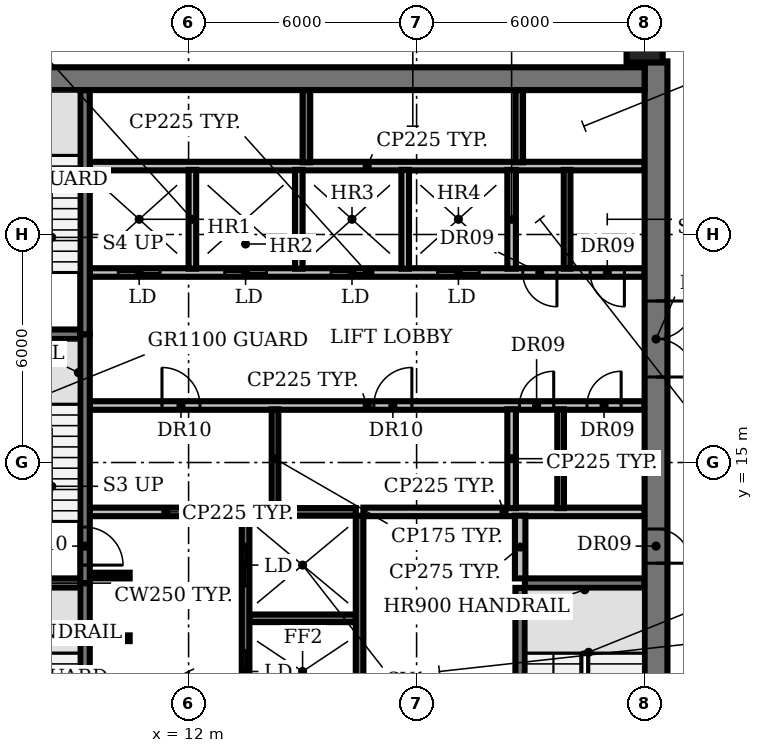
"""IFC4 building model, lengths in metres.
Left out: names, types, materials, properties, quantities, classifications, styles, units other than length and angle.
Written with IfcOpenShell. Run it as: python <this file> out.ifc"""

import sys

from ifc_helpers import new_model, si_unit, direction, frame, frame_2d, origin, origin_2d, place, context, subcontext, project, spatial, rectangle, circle, extrude, element, fill, save


model = new_model("IFC4")
c1 = context("Model", 3, precision=1e-05, world=origin(), true_north=direction((0.0, 1.0)))
c2 = subcontext(c1, "Body", "Model", "MODEL_VIEW")
j1 = project(units=[si_unit("LENGTHUNIT", "METRE"), si_unit("PLANEANGLEUNIT", "RADIAN")], contexts=[c1])
p1 = place(None, origin())
s1 = spatial("IfcSite", under=j1, at=p1, CompositionType="ELEMENT")
p2 = place(p1, origin())
s2 = spatial("IfcBuilding", under=s1, at=p2, CompositionType="ELEMENT")
p3 = place(p2, frame((0.0, 0.0, 180.2)))
s3 = spatial("IfcBuildingStorey", under=s2, at=p3, CompositionType="ELEMENT", Elevation=180.2)
p4 = place(p3, frame((24.0, 26.0, 0.0), z_axis=(0.0, 0.0, 1.0), x_axis=(1.0, 0.0, 0.0)))
e1 = element("IfcColumn", 1, at=p4, inside=s3, PredefinedType="COLUMN", context=c2, shape_type="SweptSolid", body=[
    extrude(circle(Radius=0.475, at=origin_2d()), origin(), (0.0, 0.0, 1.0), 3.85),
])
p5 = place(p3, frame((9.4, 10.375, 0.0), z_axis=(0.0, 0.0, 1.0), x_axis=(1.0, 0.0, 0.0)))
e2 = element("IfcWall", 2, at=p5, inside=s3, PredefinedType="SHEAR", context=c2, shape_type="SweptSolid", body=[
    extrude(rectangle(XDim=1.05, YDim=0.15, at=frame_2d((0.525, 0.0))), origin(), (0.0, 0.0, 1.0), 3.85),
])
p6 = place(p3, frame((13.6, 10.9, 0.0), z_axis=(0.0, 0.0, 1.0), x_axis=(1.0, 0.0, 0.0)))
e3 = element("IfcWall", 3, at=p6, inside=s3, PredefinedType="SHEAR", context=c2, shape_type="SweptSolid", body=[
    extrude(rectangle(XDim=2.8, YDim=0.2, at=frame_2d((1.4, 0.0))), origin(), (0.0, 0.0, 1.0), 3.85),
])
for number, where, z_axis, x_axis in (
    (4, (6.0, 11.825, 0.0), (0.0, 0.0, 1.0), (1.0, 0.0, 0.0)),
    (5, (20.85, 11.825, 0.0), (0.0, 0.0, 1.0), (1.0, 0.0, 0.0)),
):
    element("IfcWall", number, at=place(p3, frame(where, z_axis=z_axis, x_axis=x_axis)), inside=s3, PredefinedType="SHEAR", context=c2, shape_type="SweptSolid", body=[
        extrude(rectangle(XDim=3.15, YDim=0.25, at=frame_2d((1.575, 0.0))), origin(), (0.0, 0.0, 1.0), 3.85),
    ])
p7 = place(p3, frame((9.4, 12.025, 0.0), z_axis=(0.0, 0.0, 1.0), x_axis=(1.0, 0.0, 0.0)))
e6 = element("IfcWall", 6, at=p7, inside=s3, PredefinedType="SHEAR", context=c2, shape_type="SweptSolid", body=[
    extrude(rectangle(XDim=1.05, YDim=0.15, at=frame_2d((0.525, 0.0))), origin(), (0.0, 0.0, 1.0), 3.85),
])
p8 = place(p3, frame((9.4, 13.7, 0.0), z_axis=(0.0, 0.0, 1.0), x_axis=(1.0, 0.0, 0.0)))
e7 = element("IfcWall", 7, at=p8, inside=s3, PredefinedType="PARTITIONING", context=c2, shape_type="SweptSolid", body=[
    extrude(rectangle(XDim=4.0, YDim=0.225, at=frame_2d((2.0, 0.0))), origin(), (0.0, 0.0, 1.0), 3.85),
])
p9 = place(p3, frame((13.6, 13.7, 0.0), z_axis=(0.0, 0.0, 1.0), x_axis=(1.0, 0.0, 0.0)))
e8 = element("IfcWall", 8, at=p9, inside=s3, PredefinedType="SHEAR", context=c2, shape_type="SweptSolid", body=[
    extrude(rectangle(XDim=2.8, YDim=0.2, at=frame_2d((1.4, 0.0))), origin(), (0.0, 0.0, 1.0), 3.85),
])
p10 = place(p3, frame((16.6, 13.7, 0.0), z_axis=(0.0, 0.0, 1.0), x_axis=(1.0, 0.0, 0.0)))
e9 = element("IfcWall", 9, at=p10, inside=s3, PredefinedType="PARTITIONING", context=c2, shape_type="SweptSolid", body=[
    extrude(rectangle(XDim=7.4, YDim=0.225, at=frame_2d((3.7, 0.0))), origin(), (0.0, 0.0, 1.0), 3.85),
])
p11 = place(p3, frame((9.4, 16.5, 0.0), z_axis=(0.0, 0.0, 1.0), x_axis=(1.0, 0.0, 0.0)))
e10 = element("IfcWall", 10, at=p11, inside=s3, PredefinedType="PARTITIONING", context=c2, shape_type="SweptSolid", body=[
    extrude(rectangle(XDim=14.6, YDim=0.225, at=frame_2d((7.3, 0.0))), origin(), (0.0, 0.0, 1.0), 3.85),
])
p12 = place(p11, frame((1.9, 0.0, 0.0)))
e11 = element("IfcOpeningElement", 11, at=p12, cuts=e10, PredefinedType="OPENING", context=c2, shape_type="SweptSolid", body=[
    extrude(rectangle(XDim=1.0, YDim=2.1, at=frame_2d((0.5, 1.05))), frame((0.0, 0.123, 0.0), z_axis=(0.0, -1.0, 0.0), x_axis=(1.0, 0.0, 0.0)), (0.0, 0.0, 1.0), 0.245),
])
p13 = place(p11, frame((7.475, 0.0, 0.0)))
e12 = element("IfcOpeningElement", 12, at=p13, cuts=e10, PredefinedType="OPENING", context=c2, shape_type="SweptSolid", body=[
    extrude(rectangle(XDim=1.0, YDim=2.1, at=frame_2d((0.5, 1.05))), frame((0.0, 0.123, 0.0), z_axis=(0.0, -1.0, 0.0), x_axis=(1.0, 0.0, 0.0)), (0.0, 0.0, 1.0), 0.245),
])
p14 = place(p11, frame((11.308, 0.0, 0.0)))
e13 = element("IfcOpeningElement", 13, at=p14, cuts=e10, PredefinedType="OPENING", context=c2, shape_type="SweptSolid", body=[
    extrude(rectangle(XDim=0.9, YDim=2.1, at=frame_2d((0.45, 1.05))), frame((0.0, 0.123, 0.0), z_axis=(0.0, -1.0, 0.0), x_axis=(1.0, 0.0, 0.0)), (0.0, 0.0, 1.0), 0.245),
])
p15 = place(p11, frame((13.083, 0.0, 0.0)))
e14 = element("IfcOpeningElement", 14, at=p15, cuts=e10, PredefinedType="OPENING", context=c2, shape_type="SweptSolid", body=[
    extrude(rectangle(XDim=0.9, YDim=2.1, at=frame_2d((0.45, 1.05))), frame((0.0, 0.123, 0.0), z_axis=(0.0, -1.0, 0.0), x_axis=(1.0, 0.0, 0.0)), (0.0, 0.0, 1.0), 0.245),
])
p16 = place(p3, frame((6.0, 18.375, 0.0), z_axis=(0.0, 0.0, 1.0), x_axis=(1.0, 0.0, 0.0)))
e15 = element("IfcWall", 15, at=p16, inside=s3, PredefinedType="SHEAR", context=c2, shape_type="SweptSolid", body=[
    extrude(rectangle(XDim=3.15, YDim=0.25, at=frame_2d((1.575, 0.0))), origin(), (0.0, 0.0, 1.0), 3.85),
])
p17 = place(p3, frame((24.0, 20.0, 0.0), z_axis=(0.0, 0.0, 1.0), x_axis=(-1.0, 0.0, 0.0)))
e16 = element("IfcWall", 16, at=p17, inside=s3, PredefinedType="PARTITIONING", context=c2, shape_type="SweptSolid", body=[
    extrude(rectangle(XDim=14.6, YDim=0.225, at=frame_2d((7.3, 0.0))), origin(), (0.0, 0.0, 1.0), 3.85),
])
p18 = place(p17, frame((12.75, 0.0, 0.0)))
e17 = element("IfcOpeningElement", 17, at=p18, cuts=e16, PredefinedType="OPENING", context=c2, shape_type="SweptSolid", body=[
    extrude(rectangle(XDim=1.1, YDim=2.1, at=frame_2d((0.55, 1.05))), frame((0.0, 0.123, 0.0), z_axis=(0.0, -1.0, 0.0), x_axis=(1.0, 0.0, 0.0)), (0.0, 0.0, 1.0), 0.245),
])
p19 = place(p17, frame((9.95, 0.0, 0.0)))
e18 = element("IfcOpeningElement", 18, at=p19, cuts=e16, PredefinedType="OPENING", context=c2, shape_type="SweptSolid", body=[
    extrude(rectangle(XDim=1.1, YDim=2.1, at=frame_2d((0.55, 1.05))), frame((0.0, 0.123, 0.0), z_axis=(0.0, -1.0, 0.0), x_axis=(1.0, 0.0, 0.0)), (0.0, 0.0, 1.0), 0.245),
])
p20 = place(p17, frame((7.15, 0.0, 0.0)))
e19 = element("IfcOpeningElement", 19, at=p20, cuts=e16, PredefinedType="OPENING", context=c2, shape_type="SweptSolid", body=[
    extrude(rectangle(XDim=1.1, YDim=2.1, at=frame_2d((0.55, 1.05))), frame((0.0, 0.123, 0.0), z_axis=(0.0, -1.0, 0.0), x_axis=(1.0, 0.0, 0.0)), (0.0, 0.0, 1.0), 0.245),
])
p21 = place(p17, frame((4.35, 0.0, 0.0)))
e20 = element("IfcOpeningElement", 20, at=p21, cuts=e16, PredefinedType="OPENING", context=c2, shape_type="SweptSolid", body=[
    extrude(rectangle(XDim=1.1, YDim=2.1, at=frame_2d((0.55, 1.05))), frame((0.0, 0.123, 0.0), z_axis=(0.0, -1.0, 0.0), x_axis=(1.0, 0.0, 0.0)), (0.0, 0.0, 1.0), 0.245),
])
p22 = place(p17, frame((2.308, 0.0, 0.0)))
e21 = element("IfcOpeningElement", 21, at=p22, cuts=e16, PredefinedType="OPENING", context=c2, shape_type="SweptSolid", body=[
    extrude(rectangle(XDim=0.9, YDim=2.1, at=frame_2d((0.45, 1.05))), frame((0.0, 0.123, 0.0), z_axis=(0.0, -1.0, 0.0), x_axis=(1.0, 0.0, 0.0)), (0.0, 0.0, 1.0), 0.245),
])
p23 = place(p17, frame((0.532, 0.0, 0.0)))
e22 = element("IfcOpeningElement", 22, at=p23, cuts=e16, PredefinedType="OPENING", context=c2, shape_type="SweptSolid", body=[
    extrude(rectangle(XDim=0.9, YDim=2.1, at=frame_2d((0.45, 1.05))), frame((0.0, 0.123, 0.0), z_axis=(0.0, -1.0, 0.0), x_axis=(1.0, 0.0, 0.0)), (0.0, 0.0, 1.0), 0.245),
])
p24 = place(p3, frame((9.4, 22.8, 0.0), z_axis=(0.0, 0.0, 1.0), x_axis=(1.0, 0.0, 0.0)))
e23 = element("IfcWall", 23, at=p24, inside=s3, PredefinedType="PARTITIONING", context=c2, shape_type="SweptSolid", body=[
    extrude(rectangle(XDim=14.6, YDim=0.225, at=frame_2d((7.3, 0.0))), origin(), (0.0, 0.0, 1.0), 3.85),
])
p25 = place(p3, frame((9.275, 11.825, 0.0), z_axis=(0.0, 0.0, 1.0), x_axis=(0.0, -1.0, 0.0)))
e24 = element("IfcWall", 24, at=p25, inside=s3, PredefinedType="SHEAR", context=c2, shape_type="SweptSolid", body=[
    extrude(rectangle(XDim=6.425, YDim=0.25, at=frame_2d((3.212, 0.0))), origin(), (0.0, 0.0, 1.0), 3.85),
])
p26 = place(p25, frame((5.075, 0.0, 0.0)))
e25 = element("IfcOpeningElement", 25, at=p26, cuts=e24, PredefinedType="OPENING", context=c2, shape_type="SweptSolid", body=[
    extrude(rectangle(XDim=1.0, YDim=2.1, at=frame_2d((0.5, 1.05))), frame((0.0, 0.135, 0.0), z_axis=(0.0, -1.0, 0.0), x_axis=(1.0, 0.0, 0.0)), (0.0, 0.0, 1.0), 0.27),
])
p27 = place(p3, frame((9.275, 18.375, 0.0), z_axis=(0.0, 0.0, 1.0), x_axis=(0.0, -1.0, 0.0)))
e26 = element("IfcWall", 26, at=p27, inside=s3, PredefinedType="SHEAR", context=c2, shape_type="SweptSolid", body=[
    extrude(rectangle(XDim=6.55, YDim=0.25, at=frame_2d((3.275, 0.0))), origin(), (0.0, 0.0, 1.0), 3.85),
])
p28 = place(p27, frame((5.075, 0.0, 0.0)))
e27 = element("IfcOpeningElement", 27, at=p28, cuts=e26, PredefinedType="OPENING", context=c2, shape_type="SweptSolid", body=[
    extrude(rectangle(XDim=1.0, YDim=2.1, at=frame_2d((0.5, 1.05))), frame((0.0, 0.135, 0.0), z_axis=(0.0, -1.0, 0.0), x_axis=(1.0, 0.0, 0.0)), (0.0, 0.0, 1.0), 0.27),
])
p29 = place(p3, frame((9.275, 18.375, 0.0), z_axis=(0.0, 0.0, 1.0), x_axis=(0.0, 1.0, 0.0)))
e28 = element("IfcWall", 28, at=p29, inside=s3, PredefinedType="SHEAR", context=c2, shape_type="SweptSolid", body=[
    extrude(rectangle(XDim=6.425, YDim=0.25, at=frame_2d((3.212, 0.0))), origin(), (0.0, 0.0, 1.0), 3.85),
])
p30 = place(p3, frame((12.1, 20.1, 0.0), z_axis=(0.0, 0.0, 1.0), x_axis=(0.0, 1.0, 0.0)))
e29 = element("IfcWall", 29, at=p30, inside=s3, PredefinedType="SOLIDWALL", context=c2, shape_type="SweptSolid", body=[
    extrude(rectangle(XDim=2.6, YDim=0.2, at=frame_2d((1.3, 0.0))), origin(), (0.0, 0.0, 1.0), 3.85),
])
p31 = place(p3, frame((13.5, 5.4, 0.0), z_axis=(0.0, 0.0, 1.0), x_axis=(0.0, 1.0, 0.0)))
e30 = element("IfcWall", 30, at=p31, inside=s3, PredefinedType="SHEAR", context=c2, shape_type="SweptSolid", body=[
    extrude(rectangle(XDim=8.2, YDim=0.2, at=frame_2d((4.1, 0.0))), origin(), (0.0, 0.0, 1.0), 3.85),
])
p32 = place(p31, frame((0.75, 0.0, 0.0)))
e31 = element("IfcOpeningElement", 31, at=p32, cuts=e30, PredefinedType="OPENING", context=c2, shape_type="SweptSolid", body=[
    extrude(rectangle(XDim=1.1, YDim=2.1, at=frame_2d((0.55, 1.05))), frame((0.0, 0.11, 0.0), z_axis=(0.0, -1.0, 0.0), x_axis=(1.0, 0.0, 0.0)), (0.0, 0.0, 1.0), 0.22),
])
p33 = place(p31, frame((3.55, 0.0, 0.0)))
e32 = element("IfcOpeningElement", 32, at=p33, cuts=e30, PredefinedType="OPENING", context=c2, shape_type="SweptSolid", body=[
    extrude(rectangle(XDim=1.1, YDim=2.1, at=frame_2d((0.55, 1.05))), frame((0.0, 0.11, 0.0), z_axis=(0.0, -1.0, 0.0), x_axis=(1.0, 0.0, 0.0)), (0.0, 0.0, 1.0), 0.22),
])
p34 = place(p31, frame((6.35, 0.0, 0.0)))
e33 = element("IfcOpeningElement", 33, at=p34, cuts=e30, PredefinedType="OPENING", context=c2, shape_type="SweptSolid", body=[
    extrude(rectangle(XDim=1.1, YDim=2.1, at=frame_2d((0.55, 1.05))), frame((0.0, 0.11, 0.0), z_axis=(0.0, -1.0, 0.0), x_axis=(1.0, 0.0, 0.0)), (0.0, 0.0, 1.0), 0.22),
])
p35 = place(p3, frame((14.275, 13.8, 0.0), z_axis=(0.0, 0.0, 1.0), x_axis=(0.0, 1.0, 0.0)))
e34 = element("IfcWall", 34, at=p35, inside=s3, PredefinedType="PARTITIONING", context=c2, shape_type="SweptSolid", body=[
    extrude(rectangle(XDim=2.6, YDim=0.175, at=frame_2d((1.3, 0.0))), origin(), (0.0, 0.0, 1.0), 3.85),
])
p36 = place(p3, frame((14.9, 20.1, 0.0), z_axis=(0.0, 0.0, 1.0), x_axis=(0.0, 1.0, 0.0)))
e35 = element("IfcWall", 35, at=p36, inside=s3, PredefinedType="SOLIDWALL", context=c2, shape_type="SweptSolid", body=[
    extrude(rectangle(XDim=2.6, YDim=0.2, at=frame_2d((1.3, 0.0))), origin(), (0.0, 0.0, 1.0), 3.85),
])
p37 = place(p3, frame((15.1, 22.9, 0.0), z_axis=(0.0, 0.0, 1.0), x_axis=(0.0, 1.0, 0.0)))
e36 = element("IfcWall", 36, at=p37, inside=s3, PredefinedType="SHEAR", context=c2, shape_type="SweptSolid", body=[
    extrude(rectangle(XDim=1.9, YDim=0.2, at=frame_2d((0.95, 0.0))), origin(), (0.0, 0.0, 1.0), 3.85),
])
p38 = place(p3, frame((16.5, 5.4, 0.0), z_axis=(0.0, 0.0, 1.0), x_axis=(0.0, 1.0, 0.0)))
e37 = element("IfcWall", 37, at=p38, inside=s3, PredefinedType="SHEAR", context=c2, shape_type="SweptSolid", body=[
    extrude(rectangle(XDim=8.2, YDim=0.2, at=frame_2d((4.1, 0.0))), origin(), (0.0, 0.0, 1.0), 3.85),
])
p39 = place(p3, frame((17.7, 20.1, 0.0), z_axis=(0.0, 0.0, 1.0), x_axis=(0.0, 1.0, 0.0)))
e38 = element("IfcWall", 38, at=p39, inside=s3, PredefinedType="SOLIDWALL", context=c2, shape_type="SweptSolid", body=[
    extrude(rectangle(XDim=2.6, YDim=0.2, at=frame_2d((1.3, 0.0))), origin(), (0.0, 0.0, 1.0), 3.85),
])
for number, where, z_axis, x_axis in (
    (39, (20.5, 13.8, 0.0), (0.0, 0.0, 1.0), (0.0, 1.0, 0.0)),
    (40, (20.5, 20.1, 0.0), (0.0, 0.0, 1.0), (0.0, 1.0, 0.0)),
):
    element("IfcWall", number, at=place(p3, frame(where, z_axis=z_axis, x_axis=x_axis)), inside=s3, PredefinedType="PARTITIONING", context=c2, shape_type="SweptSolid", body=[
        extrude(rectangle(XDim=2.6, YDim=0.225, at=frame_2d((1.3, 0.0))), origin(), (0.0, 0.0, 1.0), 3.85),
    ])
p40 = place(p3, frame((20.7, 22.9, 0.0), z_axis=(0.0, 0.0, 1.0), x_axis=(0.0, 1.0, 0.0)))
e41 = element("IfcWall", 41, at=p40, inside=s3, PredefinedType="SHEAR", context=c2, shape_type="SweptSolid", body=[
    extrude(rectangle(XDim=1.9, YDim=0.2, at=frame_2d((0.95, 0.0))), origin(), (0.0, 0.0, 1.0), 3.85),
])
p41 = place(p3, frame((20.725, 5.4, 0.0), z_axis=(0.0, 0.0, 1.0), x_axis=(0.0, 1.0, 0.0)))
e42 = element("IfcWall", 42, at=p41, inside=s3, PredefinedType="SHEAR", context=c2, shape_type="SweptSolid", body=[
    extrude(rectangle(XDim=6.3, YDim=0.25, at=frame_2d((3.15, 0.0))), origin(), (0.0, 0.0, 1.0), 3.85),
])
p42 = place(p3, frame((20.725, 11.95, 0.0), z_axis=(0.0, 0.0, 1.0), x_axis=(0.0, 1.0, 0.0)))
e43 = element("IfcWall", 43, at=p42, inside=s3, PredefinedType="PARTITIONING", context=c2, shape_type="SweptSolid", body=[
    extrude(rectangle(XDim=1.65, YDim=0.275, at=frame_2d((0.825, 0.0))), origin(), (0.0, 0.0, 1.0), 3.85),
])
for number, where, z_axis, x_axis in (
    (44, (21.79, 13.8, 0.0), (0.0, 0.0, 1.0), (0.0, 1.0, 0.0)),
    (45, (21.96, 20.1, 0.0), (0.0, 0.0, 1.0), (0.0, 1.0, 0.0)),
):
    element("IfcWall", number, at=place(p3, frame(where, z_axis=z_axis, x_axis=x_axis)), inside=s3, PredefinedType="PARTITIONING", context=c2, shape_type="SweptSolid", body=[
        extrude(rectangle(XDim=2.6, YDim=0.175, at=frame_2d((1.3, 0.0))), origin(), (0.0, 0.0, 1.0), 3.85),
    ])
p43 = place(p3, frame((24.3, 25.555, 0.0), z_axis=(0.0, 0.0, 1.0), x_axis=(0.0, -1.0, 0.0)))
e46 = element("IfcWall", 46, at=p43, inside=s3, PredefinedType="SHEAR", context=c2, shape_type="SweptSolid", body=[
    extrude(rectangle(XDim=20.755, YDim=0.6, at=frame_2d((10.377, 0.0))), origin(), (0.0, 0.0, 1.0), 3.85),
])
p44 = place(p43, frame((18.405, 0.0, 0.0)))
e47 = element("IfcOpeningElement", 47, at=p44, cuts=e46, PredefinedType="OPENING", context=c2, shape_type="SweptSolid", body=[
    extrude(rectangle(XDim=1.5, YDim=2.1, at=frame_2d((0.75, 1.05))), frame((0.0, 0.31, 0.0), z_axis=(0.0, -1.0, 0.0), x_axis=(1.0, 0.0, 0.0)), (0.0, 0.0, 1.0), 0.62),
])
p45 = place(p43, frame((12.305, 0.0, 0.0)))
e48 = element("IfcOpeningElement", 48, at=p45, cuts=e46, PredefinedType="OPENING", context=c2, shape_type="SweptSolid", body=[
    extrude(rectangle(XDim=0.9, YDim=2.1, at=frame_2d((0.45, 1.05))), frame((0.0, 0.31, 0.0), z_axis=(0.0, -1.0, 0.0), x_axis=(1.0, 0.0, 0.0)), (0.0, 0.0, 1.0), 0.62),
])
p46 = place(p43, frame((6.305, 0.0, 0.0)))
e49 = element("IfcOpeningElement", 49, at=p46, cuts=e46, PredefinedType="OPENING", context=c2, shape_type="SweptSolid", body=[
    extrude(rectangle(XDim=2.0, YDim=2.1, at=frame_2d((1.0, 1.05))), frame((0.0, 0.31, 0.0), z_axis=(0.0, -1.0, 0.0), x_axis=(1.0, 0.0, 0.0)), (0.0, 0.0, 1.0), 0.62),
])
p47 = place(p3, frame((6.0, 25.1, 0.0), z_axis=(0.0, 0.0, 1.0), x_axis=(1.0, 0.0, 0.0)))
e50 = element("IfcWall", 50, at=p47, inside=s3, PredefinedType="SHEAR", context=c2, shape_type="SweptSolid", body=[
    extrude(rectangle(XDim=18.0, YDim=0.6, at=frame_2d((9.0, 0.0))), origin(), (0.0, 0.0, 1.0), 3.85),
])
p48 = place(p12, origin())
e51 = element("IfcDoor", 51, at=p48, inside=s3, OperationType="SINGLE_SWING_LEFT", PredefinedType="DOOR", context=c2, shape_type="SweptSolid", body=[
    extrude(rectangle(XDim=1.0, YDim=2.1, at=frame_2d((0.5, 1.05))), frame((0.0, 0.025, 0.0), z_axis=(0.0, -1.0, 0.0), x_axis=(1.0, 0.0, 0.0)), (0.0, 0.0, 1.0), 0.05),
])
fill(e11, e51)
p49 = place(p13, origin())
e52 = element("IfcDoor", 52, at=p49, inside=s3, OperationType="SINGLE_SWING_RIGHT", PredefinedType="DOOR", context=c2, shape_type="SweptSolid", body=[
    extrude(rectangle(XDim=1.0, YDim=2.1, at=frame_2d((0.5, 1.05))), frame((0.0, 0.025, 0.0), z_axis=(0.0, -1.0, 0.0), x_axis=(1.0, 0.0, 0.0)), (0.0, 0.0, 1.0), 0.05),
])
fill(e12, e52)
p50 = place(p14, origin())
e53 = element("IfcDoor", 53, at=p50, inside=s3, OperationType="SINGLE_SWING_RIGHT", PredefinedType="DOOR", context=c2, shape_type="SweptSolid", body=[
    extrude(rectangle(XDim=0.9, YDim=2.1, at=frame_2d((0.45, 1.05))), frame((0.0, 0.025, 0.0), z_axis=(0.0, -1.0, 0.0), x_axis=(1.0, 0.0, 0.0)), (0.0, 0.0, 1.0), 0.05),
])
fill(e13, e53)
p51 = place(p15, origin())
e54 = element("IfcDoor", 54, at=p51, inside=s3, OperationType="SINGLE_SWING_RIGHT", PredefinedType="DOOR", context=c2, shape_type="SweptSolid", body=[
    extrude(rectangle(XDim=0.9, YDim=2.1, at=frame_2d((0.45, 1.05))), frame((0.0, 0.025, 0.0), z_axis=(0.0, -1.0, 0.0), x_axis=(1.0, 0.0, 0.0)), (0.0, 0.0, 1.0), 0.05),
])
fill(e14, e54)
p52 = place(p18, origin())
e55 = element("IfcDoor", 55, at=p52, inside=s3, OperationType="DOUBLE_DOOR_SLIDING", PredefinedType="DOOR", context=c2, shape_type="SweptSolid", body=[
    extrude(rectangle(XDim=1.1, YDim=2.1, at=frame_2d((0.55, 1.05))), frame((0.0, 0.025, 0.0), z_axis=(0.0, -1.0, 0.0), x_axis=(1.0, 0.0, 0.0)), (0.0, 0.0, 1.0), 0.05),
])
fill(e17, e55)
p53 = place(p19, origin())
e56 = element("IfcDoor", 56, at=p53, inside=s3, OperationType="DOUBLE_DOOR_SLIDING", PredefinedType="DOOR", context=c2, shape_type="SweptSolid", body=[
    extrude(rectangle(XDim=1.1, YDim=2.1, at=frame_2d((0.55, 1.05))), frame((0.0, 0.025, 0.0), z_axis=(0.0, -1.0, 0.0), x_axis=(1.0, 0.0, 0.0)), (0.0, 0.0, 1.0), 0.05),
])
fill(e18, e56)
p54 = place(p20, origin())
e57 = element("IfcDoor", 57, at=p54, inside=s3, OperationType="DOUBLE_DOOR_SLIDING", PredefinedType="DOOR", context=c2, shape_type="SweptSolid", body=[
    extrude(rectangle(XDim=1.1, YDim=2.1, at=frame_2d((0.55, 1.05))), frame((0.0, 0.025, 0.0), z_axis=(0.0, -1.0, 0.0), x_axis=(1.0, 0.0, 0.0)), (0.0, 0.0, 1.0), 0.05),
])
fill(e19, e57)
p55 = place(p21, origin())
e58 = element("IfcDoor", 58, at=p55, inside=s3, OperationType="DOUBLE_DOOR_SLIDING", PredefinedType="DOOR", context=c2, shape_type="SweptSolid", body=[
    extrude(rectangle(XDim=1.1, YDim=2.1, at=frame_2d((0.55, 1.05))), frame((0.0, 0.025, 0.0), z_axis=(0.0, -1.0, 0.0), x_axis=(1.0, 0.0, 0.0)), (0.0, 0.0, 1.0), 0.05),
])
fill(e20, e58)
p56 = place(p22, origin())
e59 = element("IfcDoor", 59, at=p56, inside=s3, OperationType="SINGLE_SWING_LEFT", PredefinedType="DOOR", context=c2, shape_type="SweptSolid", body=[
    extrude(rectangle(XDim=0.9, YDim=2.1, at=frame_2d((0.45, 1.05))), frame((0.0, 0.025, 0.0), z_axis=(0.0, -1.0, 0.0), x_axis=(1.0, 0.0, 0.0)), (0.0, 0.0, 1.0), 0.05),
])
fill(e21, e59)
p57 = place(p23, origin())
e60 = element("IfcDoor", 60, at=p57, inside=s3, OperationType="SINGLE_SWING_LEFT", PredefinedType="DOOR", context=c2, shape_type="SweptSolid", body=[
    extrude(rectangle(XDim=0.9, YDim=2.1, at=frame_2d((0.45, 1.05))), frame((0.0, 0.025, 0.0), z_axis=(0.0, -1.0, 0.0), x_axis=(1.0, 0.0, 0.0)), (0.0, 0.0, 1.0), 0.05),
])
fill(e22, e60)
p58 = place(p28, origin())
e61 = element("IfcDoor", 61, at=p58, inside=s3, OperationType="SINGLE_SWING_RIGHT", PredefinedType="DOOR", context=c2, shape_type="SweptSolid", body=[
    extrude(rectangle(XDim=1.0, YDim=2.1, at=frame_2d((0.5, 1.05))), frame((0.0, 0.025, 0.0), z_axis=(0.0, -1.0, 0.0), x_axis=(1.0, 0.0, 0.0)), (0.0, 0.0, 1.0), 0.05),
])
fill(e27, e61)
p59 = place(p33, origin())
e62 = element("IfcDoor", 62, at=p59, inside=s3, OperationType="DOUBLE_DOOR_SLIDING", PredefinedType="DOOR", context=c2, shape_type="SweptSolid", body=[
    extrude(rectangle(XDim=1.1, YDim=2.1, at=frame_2d((0.55, 1.05))), frame((0.0, 0.025, 0.0), z_axis=(0.0, -1.0, 0.0), x_axis=(1.0, 0.0, 0.0)), (0.0, 0.0, 1.0), 0.05),
])
fill(e32, e62)
p60 = place(p34, origin())
e63 = element("IfcDoor", 63, at=p60, inside=s3, OperationType="DOUBLE_DOOR_SLIDING", PredefinedType="DOOR", context=c2, shape_type="SweptSolid", body=[
    extrude(rectangle(XDim=1.1, YDim=2.1, at=frame_2d((0.55, 1.05))), frame((0.0, 0.025, 0.0), z_axis=(0.0, -1.0, 0.0), x_axis=(1.0, 0.0, 0.0)), (0.0, 0.0, 1.0), 0.05),
])
fill(e33, e63)
p61 = place(p45, origin())
e64 = element("IfcDoor", 64, at=p61, inside=s3, OperationType="SINGLE_SWING_RIGHT", PredefinedType="DOOR", context=c2, shape_type="SweptSolid", body=[
    extrude(rectangle(XDim=0.9, YDim=2.1, at=frame_2d((0.45, 1.05))), frame((0.0, -0.24, 0.0), z_axis=(0.0, -1.0, 0.0), x_axis=(1.0, 0.0, 0.0)), (0.0, 0.0, 1.0), 0.05),
])
fill(e48, e64)
p62 = place(p46, origin())
e65 = element("IfcDoor", 65, at=p62, inside=s3, OperationType="DOUBLE_DOOR_SINGLE_SWING", PredefinedType="DOOR", context=c2, shape_type="SweptSolid", body=[
    extrude(rectangle(XDim=2.0, YDim=2.1, at=frame_2d((1.0, 1.05))), frame((0.0, 0.025, 0.0), z_axis=(0.0, -1.0, 0.0), x_axis=(1.0, 0.0, 0.0)), (0.0, 0.0, 1.0), 0.05),
])
fill(e49, e65)
save(model, sys.argv[1])
